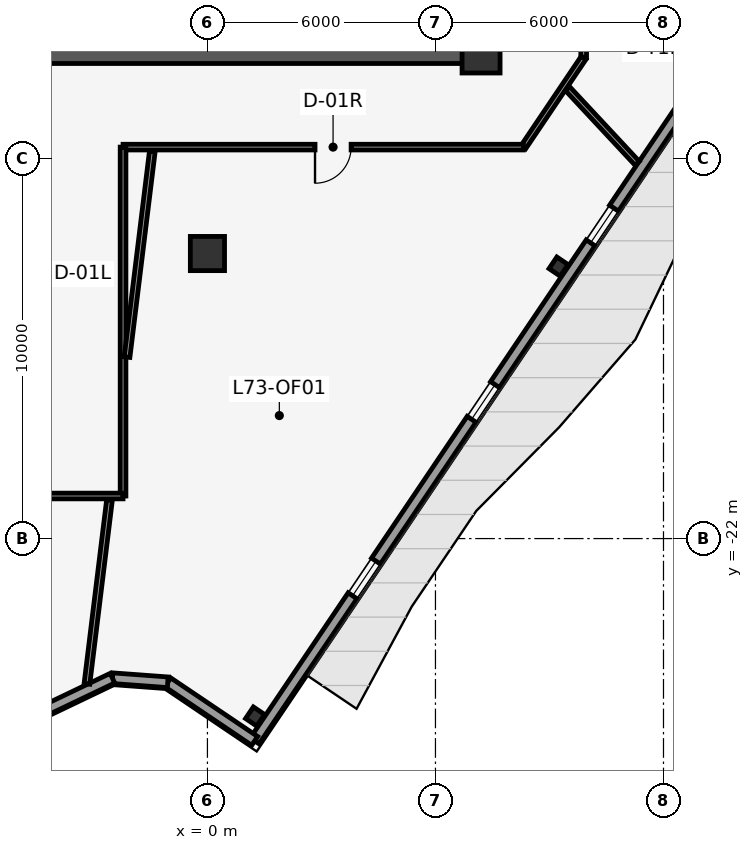
"""IFC4 building model, lengths in metres.
Left out: names, types, materials, properties, quantities, classifications, styles, units other than length and angle.
Written with IfcOpenShell. Run it as: python <this file> out.ifc"""

import sys

from ifc_helpers import new_model, si_unit, direction, frame, frame_2d, origin, origin_2d, place, context, subcontext, project, spatial, rectangle, i_section, extrude, element, fill, save


model = new_model("IFC4")
c1 = context("Model", 3, precision=1e-05, world=origin(), true_north=direction((0.0, 1.0)))
c2 = subcontext(c1, "Body", "Model", "MODEL_VIEW")
j1 = project(units=[si_unit("LENGTHUNIT", "METRE"), si_unit("PLANEANGLEUNIT", "RADIAN")], contexts=[c1])
p1 = place(None, origin())
s1 = spatial("IfcSite", under=j1, at=p1, CompositionType="ELEMENT")
p2 = place(p1, origin())
s2 = spatial("IfcBuilding", under=s1, at=p2, CompositionType="ELEMENT")
p3 = place(p2, frame((0.0, 0.0, 310.6)))
s3 = spatial("IfcBuildingStorey", under=s2, at=p3, CompositionType="ELEMENT", Elevation=310.6)
p4 = place(p3, frame((-7.45, -9.25, 0.0), z_axis=(0.0, 0.0, 1.0), x_axis=(1.0, 0.0, 0.0)))
e1 = element("IfcWall", 1, at=p4, inside=s3, PredefinedType="SHEAR", context=c2, shape_type="SweptSolid", body=[
    extrude(rectangle(XDim=14.9, YDim=0.5, at=frame_2d((7.45, 0.0))), origin(), (0.0, 0.0, 1.0), 3.85),
])
p5 = place(p3, frame((7.2, -9.25, 0.0), z_axis=(0.0, 0.0, 1.0), x_axis=(1.0, 0.0, 0.0)))
e2 = element("IfcColumn", 2, at=p5, inside=s3, PredefinedType="COLUMN", context=c2, shape_type="SweptSolid", body=[
    extrude(rectangle(XDim=1.0, YDim=1.0, at=origin_2d()), origin(), (0.0, 0.0, 1.0), 4.1),
])
p6 = place(p3, frame((0.0, -14.5, 0.0), z_axis=(0.0, 0.0, 1.0), x_axis=(1.0, 0.0, 0.0)))
e3 = element("IfcColumn", 3, at=p6, inside=s3, PredefinedType="COLUMN", context=c2, shape_type="SweptSolid", body=[
    extrude(rectangle(XDim=0.9, YDim=0.9, at=origin_2d()), origin(), (0.0, 0.0, 1.0), 4.1),
])
for number, where, z_axis, x_axis in (
    (4, (1.254, -26.682, 0.0), (0.0, 0.0, 1.0), (0.559, 0.829, 0.0)),
    (5, (9.239, -14.844, 0.0), (0.0, 0.0, 1.0), (0.559, 0.829, 0.0)),
):
    element("IfcColumn", number, at=place(p3, frame(where, z_axis=z_axis, x_axis=x_axis)), inside=s3, PredefinedType="COLUMN", context=c2, shape_type="SweptSolid", body=[
        extrude(i_section(OverallWidth=0.368, OverallDepth=0.356, WebThickness=0.011, FlangeThickness=0.018, at=origin_2d()), origin(), (0.0, 0.0, 1.0), 4.1),
    ])
p7 = place(p3, frame((25.8, 9.083, 0.0), z_axis=(0.0, 0.0, 1.0), x_axis=(-0.55919392155, -0.829036885851, 0.0)))
e6 = element("IfcWall", 6, at=p7, inside=s3, PredefinedType="STANDARD", context=c2, shape_type="SweptSolid", body=[
    extrude(rectangle(XDim=43.915, YDim=0.28, at=frame_2d((21.958, 0.0))), origin(), (0.0, 0.0, 1.0), 3.85),
])
p8 = place(p7, frame((21.457, 0.0, 0.0)))
e7 = element("IfcOpeningElement", 7, at=p8, cuts=e6, PredefinedType="OPENING", context=c2, shape_type="SweptSolid", body=[
    extrude(rectangle(XDim=1.0, YDim=2.15, at=frame_2d((0.5, 1.075))), frame((0.0, 0.15, 0.0), z_axis=(0.0, -1.0, 0.0), x_axis=(1.0, 0.0, 0.0)), (0.0, 0.0, 1.0), 0.3),
])
p9 = place(p7, frame((4.607, 0.0, 0.85)))
e8 = element("IfcOpeningElement", 8, at=p9, cuts=e6, PredefinedType="OPENING", context=c2, shape_type="SweptSolid", body=[
    extrude(rectangle(XDim=1.1, YDim=2.15, at=frame_2d((0.55, 1.075))), frame((0.0, 0.15, 0.0), z_axis=(0.0, -1.0, 0.0), x_axis=(1.0, 0.0, 0.0)), (0.0, 0.0, 1.0), 0.3),
])
p10 = place(p7, frame((15.807, 0.0, 0.85)))
e9 = element("IfcOpeningElement", 9, at=p10, cuts=e6, PredefinedType="OPENING", context=c2, shape_type="SweptSolid", body=[
    extrude(rectangle(XDim=1.1, YDim=2.15, at=frame_2d((0.55, 1.075))), frame((0.0, 0.15, 0.0), z_axis=(0.0, -1.0, 0.0), x_axis=(1.0, 0.0, 0.0)), (0.0, 0.0, 1.0), 0.3),
])
p11 = place(p7, frame((27.007, 0.0, 0.85)))
e10 = element("IfcOpeningElement", 10, at=p11, cuts=e6, PredefinedType="OPENING", context=c2, shape_type="SweptSolid", body=[
    extrude(rectangle(XDim=1.1, YDim=2.15, at=frame_2d((0.55, 1.075))), frame((0.0, 0.15, 0.0), z_axis=(0.0, -1.0, 0.0), x_axis=(1.0, 0.0, 0.0)), (0.0, 0.0, 1.0), 0.3),
])
p12 = place(p7, frame((32.607, 0.0, 0.85)))
e11 = element("IfcOpeningElement", 11, at=p12, cuts=e6, PredefinedType="OPENING", context=c2, shape_type="SweptSolid", body=[
    extrude(rectangle(XDim=1.1, YDim=2.15, at=frame_2d((0.55, 1.075))), frame((0.0, 0.15, 0.0), z_axis=(0.0, -1.0, 0.0), x_axis=(1.0, 0.0, 0.0)), (0.0, 0.0, 1.0), 0.3),
])
p13 = place(p7, frame((38.207, 0.0, 0.85)))
e12 = element("IfcOpeningElement", 12, at=p13, cuts=e6, PredefinedType="OPENING", context=c2, shape_type="SweptSolid", body=[
    extrude(rectangle(XDim=1.1, YDim=2.15, at=frame_2d((0.55, 1.075))), frame((0.0, 0.15, 0.0), z_axis=(0.0, -1.0, 0.0), x_axis=(1.0, 0.0, 0.0)), (0.0, 0.0, 1.0), 0.3),
])
p14 = place(p3, frame((1.243, -27.324, 0.0), z_axis=(0.0, 0.0, 1.0), x_axis=(-0.829015842911, 0.559225117643, 0.0)))
e13 = element("IfcWall", 13, at=p14, inside=s3, PredefinedType="STANDARD", context=c2, shape_type="SweptSolid", body=[
    extrude(rectangle(XDim=2.759, YDim=0.28, at=frame_2d((1.379, 0.0))), origin(), (0.0, 0.0, 1.0), 3.85),
])
p15 = place(p3, frame((-1.044, -25.781, 0.0), z_axis=(0.0, 0.0, 1.0), x_axis=(-0.997286893261, 0.073612855735, 0.0)))
e14 = element("IfcWall", 14, at=p15, inside=s3, PredefinedType="STANDARD", context=c2, shape_type="SweptSolid", body=[
    extrude(rectangle(XDim=1.459, YDim=0.28, at=frame_2d((0.729, 0.0))), origin(), (0.0, 0.0, 1.0), 3.85),
])
p16 = place(p3, frame((-2.5, -25.674, 0.0), z_axis=(0.0, 0.0, 1.0), x_axis=(-0.902044352952, -0.431643354296, 0.0)))
e15 = element("IfcWall", 15, at=p16, inside=s3, PredefinedType="STANDARD", context=c2, shape_type="SweptSolid", body=[
    extrude(rectangle(XDim=2.759, YDim=0.28, at=frame_2d((1.379, 0.0))), origin(), (0.0, 0.0, 1.0), 3.85),
])
p17 = place(p3, frame((9.9, 11.85, 0.0), z_axis=(0.0, 0.0, 1.0), x_axis=(0.0, -1.0, 0.0)))
e16 = element("IfcWall", 16, at=p17, inside=s3, PredefinedType="PARTITIONING", context=c2, shape_type="SweptSolid", body=[
    extrude(rectangle(XDim=21.198, YDim=0.15, at=frame_2d((10.599, 0.0))), origin(), (0.0, 0.0, 1.0), 3.85),
])
p18 = place(p17, frame((16.009, 0.0, 0.0)))
e17 = element("IfcOpeningElement", 17, at=p18, cuts=e16, PredefinedType="OPENING", context=c2, shape_type="SweptSolid", body=[
    extrude(rectangle(XDim=0.95, YDim=2.15, at=frame_2d((0.475, 1.075))), frame((0.0, 0.085, 0.0), z_axis=(0.0, -1.0, 0.0), x_axis=(1.0, 0.0, 0.0)), (0.0, 0.0, 1.0), 0.17),
])
p19 = place(p17, frame((5.664, 0.0, 0.0)))
e18 = element("IfcOpeningElement", 18, at=p19, cuts=e16, PredefinedType="OPENING", context=c2, shape_type="SweptSolid", body=[
    extrude(rectangle(XDim=0.95, YDim=2.15, at=frame_2d((0.475, 1.075))), frame((0.0, 0.085, 0.0), z_axis=(0.0, -1.0, 0.0), x_axis=(1.0, 0.0, 0.0)), (0.0, 0.0, 1.0), 0.17),
])
p20 = place(p3, frame((9.9, -9.348, 0.0), z_axis=(0.0, 0.0, 1.0), x_axis=(-0.559200828408, -0.829032227062, 0.0)))
e19 = element("IfcWall", 19, at=p20, inside=s3, PredefinedType="PARTITIONING", context=c2, shape_type="SweptSolid", body=[
    extrude(rectangle(XDim=2.836, YDim=0.15, at=frame_2d((1.418, 0.0))), origin(), (0.0, 0.0, 1.0), 3.85),
])
p21 = place(p3, frame((8.314, -11.7, 0.0), z_axis=(0.0, 0.0, 1.0), x_axis=(-1.0, 0.0, 0.0)))
e20 = element("IfcWall", 20, at=p21, inside=s3, PredefinedType="PARTITIONING", context=c2, shape_type="SweptSolid", body=[
    extrude(rectangle(XDim=10.534, YDim=0.15, at=frame_2d((5.267, 0.0))), origin(), (0.0, 0.0, 1.0), 3.85),
])
p22 = place(p21, frame((4.533, 0.0, 0.0)))
e21 = element("IfcOpeningElement", 21, at=p22, cuts=e20, PredefinedType="OPENING", context=c2, shape_type="SweptSolid", body=[
    extrude(rectangle(XDim=0.95, YDim=2.15, at=frame_2d((0.475, 1.075))), frame((0.0, 0.085, 0.0), z_axis=(0.0, -1.0, 0.0), x_axis=(1.0, 0.0, 0.0)), (0.0, 0.0, 1.0), 0.17),
])
p23 = place(p3, frame((-2.22, -11.7, 0.0), z_axis=(0.0, 0.0, 1.0), x_axis=(0.0, -1.0, 0.0)))
e22 = element("IfcWall", 22, at=p23, inside=s3, PredefinedType="PARTITIONING", context=c2, shape_type="SweptSolid", body=[
    extrude(rectangle(XDim=9.18, YDim=0.15, at=frame_2d((4.59, 0.0))), origin(), (0.0, 0.0, 1.0), 3.85),
])
p24 = place(p3, frame((-2.22, -20.88, 0.0), z_axis=(0.0, 0.0, 1.0), x_axis=(-1.0, 0.0, 0.0)))
e23 = element("IfcWall", 23, at=p24, inside=s3, PredefinedType="PARTITIONING", context=c2, shape_type="SweptSolid", body=[
    extrude(rectangle(XDim=2.31, YDim=0.15, at=frame_2d((1.155, 0.0))), origin(), (0.0, 0.0, 1.0), 3.85),
])
p25 = place(p3, frame((-1.449, -11.805, 0.0), z_axis=(0.0, 0.0, 1.0), x_axis=(-0.121866576679, -0.992546491349, 0.0)))
e24 = element("IfcWall", 24, at=p25, inside=s3, PredefinedType="PARTITIONING", context=c2, shape_type="SweptSolid", body=[
    extrude(rectangle(XDim=5.461, YDim=0.15, at=frame_2d((2.73, 0.0))), origin(), (0.0, 0.0, 1.0), 3.85),
])
p26 = place(p3, frame((-2.577, -20.985, 0.0), z_axis=(0.0, 0.0, 1.0), x_axis=(-0.12186446529, -0.992546750586, 0.0)))
e25 = element("IfcWall", 25, at=p26, inside=s3, PredefinedType="PARTITIONING", context=c2, shape_type="SweptSolid", body=[
    extrude(rectangle(XDim=4.874, YDim=0.15, at=frame_2d((2.437, 0.0))), origin(), (0.0, 0.0, 1.0), 3.85),
])
p27 = place(p3, frame((9.477, -10.163, 0.0), z_axis=(0.0, 0.0, 1.0), x_axis=(0.682023235441, -0.731330504163, 0.0)))
e26 = element("IfcWall", 26, at=p27, inside=s3, PredefinedType="PARTITIONING", context=c2, shape_type="SweptSolid", body=[
    extrude(rectangle(XDim=2.684, YDim=0.15, at=frame_2d((1.342, 0.0))), origin(), (0.0, 0.0, 1.0), 3.85),
])
p28 = place(p11, origin())
e27 = element("IfcWindow", 27, at=p28, inside=s3, PartitioningType="SINGLE_PANEL", PredefinedType="WINDOW", context=c2, shape_type="SweptSolid", body=[
    extrude(rectangle(XDim=1.1, YDim=2.15, at=frame_2d((0.55, 1.075))), frame((0.0, 0.03, 0.0), z_axis=(0.0, -1.0, 0.0), x_axis=(1.0, 0.0, 0.0)), (0.0, 0.0, 1.0), 0.06),
])
fill(e10, e27)
p29 = place(p12, origin())
e28 = element("IfcWindow", 28, at=p29, inside=s3, PartitioningType="SINGLE_PANEL", PredefinedType="WINDOW", context=c2, shape_type="SweptSolid", body=[
    extrude(rectangle(XDim=1.1, YDim=2.15, at=frame_2d((0.55, 1.075))), frame((0.0, 0.03, 0.0), z_axis=(0.0, -1.0, 0.0), x_axis=(1.0, 0.0, 0.0)), (0.0, 0.0, 1.0), 0.06),
])
fill(e11, e28)
p30 = place(p13, origin())
e29 = element("IfcWindow", 29, at=p30, inside=s3, PartitioningType="SINGLE_PANEL", PredefinedType="WINDOW", context=c2, shape_type="SweptSolid", body=[
    extrude(rectangle(XDim=1.1, YDim=2.15, at=frame_2d((0.55, 1.075))), frame((0.0, 0.03, 0.0), z_axis=(0.0, -1.0, 0.0), x_axis=(1.0, 0.0, 0.0)), (0.0, 0.0, 1.0), 0.06),
])
fill(e12, e29)
p31 = place(p22, origin())
e30 = element("IfcDoor", 30, at=p31, inside=s3, OperationType="SINGLE_SWING_RIGHT", PredefinedType="DOOR", context=c2, shape_type="SweptSolid", body=[
    extrude(rectangle(XDim=0.95, YDim=2.15, at=frame_2d((0.475, 1.075))), frame((0.0, 0.025, 0.0), z_axis=(0.0, -1.0, 0.0), x_axis=(1.0, 0.0, 0.0)), (0.0, 0.0, 1.0), 0.05),
])
fill(e21, e30)
save(model, sys.argv[1])
